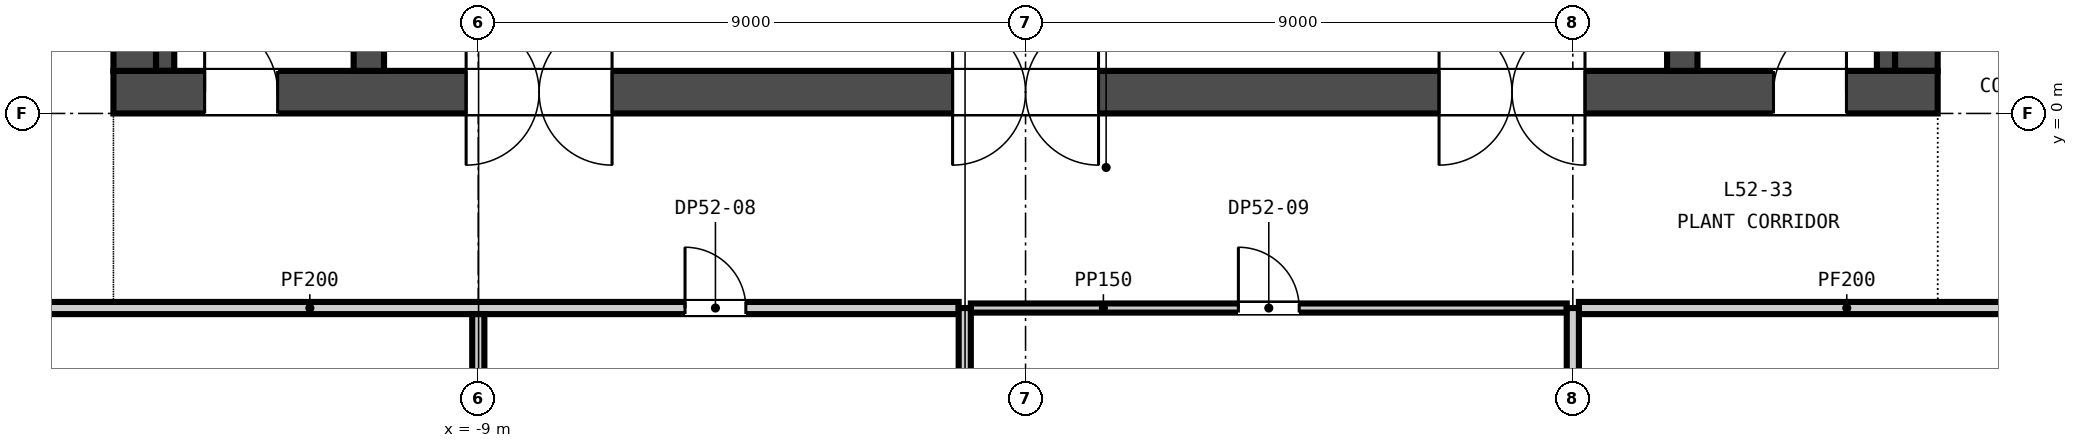
"""IFC4 building model, lengths in metres.
Left out: names, types, materials, properties, quantities, classifications, styles, units other than length and angle.
Written with IfcOpenShell. Run it as: python <this file> out.ifc"""

import sys

from ifc_helpers import new_model, si_unit, direction, frame, frame_2d, origin, place, context, subcontext, project, spatial, rectangle, extrude, element, fill, save


model = new_model("IFC4")
c1 = context("Model", 3, precision=1e-05, world=origin(), true_north=direction((0.0, 1.0)))
c2 = subcontext(c1, "Body", "Model", "MODEL_VIEW")
j1 = project(units=[si_unit("LENGTHUNIT", "METRE"), si_unit("PLANEANGLEUNIT", "RADIAN")], contexts=[c1])
p1 = place(None, origin())
s1 = spatial("IfcSite", under=j1, at=p1, CompositionType="ELEMENT")
p2 = place(p1, origin())
s2 = spatial("IfcBuilding", under=s1, at=p2, CompositionType="ELEMENT")
p3 = place(p2, frame((0.0, 0.0, 207.3)))
s3 = spatial("IfcBuildingStorey", under=s2, at=p3, CompositionType="ELEMENT", Elevation=207.3)
p4 = place(p3, frame((-15.0, 0.35, -0.3), z_axis=(0.0, 0.0, 1.0), x_axis=(1.0, 0.0, 0.0)))
e1 = element("IfcWall", 1, at=p4, inside=s3, PredefinedType="SOLIDWALL", context=c2, shape_type="SweptSolid", body=[
    extrude(rectangle(XDim=30.0, YDim=0.7, at=frame_2d((15.0, 0.0))), origin(), (0.0, 0.0, 1.0), 4.5),
])
p5 = place(p4, frame((5.8, 0.0, 0.3)))
e2 = element("IfcOpeningElement", 2, at=p5, cuts=e1, PredefinedType="OPENING", context=c2, shape_type="SweptSolid", body=[
    extrude(rectangle(XDim=2.4, YDim=2.4, at=frame_2d((1.2, 1.2))), frame((0.0, 0.36, 0.0), z_axis=(0.0, -1.0, 0.0), x_axis=(1.0, 0.0, 0.0)), (0.0, 0.0, 1.0), 0.72),
])
p6 = place(p4, frame((13.8, 0.0, 0.3)))
e3 = element("IfcOpeningElement", 3, at=p6, cuts=e1, PredefinedType="OPENING", context=c2, shape_type="SweptSolid", body=[
    extrude(rectangle(XDim=2.4, YDim=2.4, at=frame_2d((1.2, 1.2))), frame((0.0, 0.36, 0.0), z_axis=(0.0, -1.0, 0.0), x_axis=(1.0, 0.0, 0.0)), (0.0, 0.0, 1.0), 0.72),
])
p7 = place(p4, frame((21.8, 0.0, 0.3)))
e4 = element("IfcOpeningElement", 4, at=p7, cuts=e1, PredefinedType="OPENING", context=c2, shape_type="SweptSolid", body=[
    extrude(rectangle(XDim=2.4, YDim=2.4, at=frame_2d((1.2, 1.2))), frame((0.0, 0.36, 0.0), z_axis=(0.0, -1.0, 0.0), x_axis=(1.0, 0.0, 0.0)), (0.0, 0.0, 1.0), 0.72),
])
p8 = place(p4, frame((1.5, 0.0, 0.3)))
e5 = element("IfcOpeningElement", 5, at=p8, cuts=e1, PredefinedType="OPENING", context=c2, shape_type="SweptSolid", body=[
    extrude(rectangle(XDim=1.2, YDim=2.1, at=frame_2d((0.6, 1.05))), frame((0.0, 0.36, 0.0), z_axis=(0.0, -1.0, 0.0), x_axis=(1.0, 0.0, 0.0)), (0.0, 0.0, 1.0), 0.72),
])
p9 = place(p4, frame((27.3, 0.0, 0.3)))
e6 = element("IfcOpeningElement", 6, at=p9, cuts=e1, PredefinedType="OPENING", context=c2, shape_type="SweptSolid", body=[
    extrude(rectangle(XDim=1.2, YDim=2.1, at=frame_2d((0.6, 1.05))), frame((0.0, 0.36, 0.0), z_axis=(0.0, -1.0, 0.0), x_axis=(1.0, 0.0, 0.0)), (0.0, 0.0, 1.0), 0.72),
])
for number, where, z_axis, x_axis in (
    (7, (-14.65, 0.7, -0.3), (0.0, 0.0, 1.0), (0.0, 1.0, 0.0)),
    (8, (14.65, 0.7, -0.3), (0.0, 0.0, 1.0), (0.0, 1.0, 0.0)),
):
    element("IfcWall", number, at=place(p3, frame(where, z_axis=z_axis, x_axis=x_axis)), inside=s3, PredefinedType="SOLIDWALL", context=c2, shape_type="SweptSolid", body=[
        extrude(rectangle(XDim=13.6, YDim=0.7, at=frame_2d((6.8, 0.0))), origin(), (0.0, 0.0, 1.0), 4.5),
    ])
for number, where, z_axis, x_axis in (
    (9, (-10.8, 0.7, -0.3), (0.0, 0.0, 1.0), (0.0, 1.0, 0.0)),
    (10, (10.8, 0.7, -0.3), (0.0, 0.0, 1.0), (0.0, 1.0, 0.0)),
):
    element("IfcWall", number, at=place(p3, frame(where, z_axis=z_axis, x_axis=x_axis)), inside=s3, PredefinedType="SOLIDWALL", context=c2, shape_type="SweptSolid", body=[
        extrude(rectangle(XDim=13.6, YDim=0.5, at=frame_2d((6.8, 0.0))), origin(), (0.0, 0.0, 1.0), 4.5),
    ])
for number, where, z_axis, x_axis in (
    (11, (-14.15, 0.7, 0.0), (0.0, 0.0, 1.0), (0.0, 1.0, 0.0)),
    (12, (14.15, 0.7, 0.0), (0.0, 0.0, 1.0), (0.0, 1.0, 0.0)),
):
    element("IfcWall", number, at=place(p3, frame(where, z_axis=z_axis, x_axis=x_axis)), inside=s3, PredefinedType="SOLIDWALL", context=c2, shape_type="SweptSolid", body=[
        extrude(rectangle(XDim=13.6, YDim=0.3, at=frame_2d((6.8, 0.0))), origin(), (0.0, 0.0, 1.0), 4.2),
    ])
p10 = place(p3, frame((-17.9, -3.2, 0.0), z_axis=(0.0, 0.0, 1.0), x_axis=(1.0, 0.0, 0.0)))
e13 = element("IfcWall", 13, at=p10, inside=s3, PredefinedType="PARTITIONING", context=c2, shape_type="SweptSolid", body=[
    extrude(rectangle(XDim=16.8, YDim=0.2, at=frame_2d((8.4, 0.0))), origin(), (0.0, 0.0, 1.0), 4.2),
])
p11 = place(p10, frame((12.3, 0.0, 0.0)))
e14 = element("IfcOpeningElement", 14, at=p11, cuts=e13, PredefinedType="OPENING", context=c2, shape_type="SweptSolid", body=[
    extrude(rectangle(XDim=1.0, YDim=2.1, at=frame_2d((0.5, 1.05))), frame((0.0, 0.11, 0.0), z_axis=(0.0, -1.0, 0.0), x_axis=(1.0, 0.0, 0.0)), (0.0, 0.0, 1.0), 0.22),
])
p12 = place(p3, frame((-0.9, -3.2, 0.0), z_axis=(0.0, 0.0, 1.0), x_axis=(1.0, 0.0, 0.0)))
e15 = element("IfcWall", 15, at=p12, inside=s3, PredefinedType="PARTITIONING", context=c2, shape_type="SweptSolid", body=[
    extrude(rectangle(XDim=9.8, YDim=0.15, at=frame_2d((4.9, 0.0))), origin(), (0.0, 0.0, 1.0), 4.2),
])
p13 = place(p12, frame((4.4, 0.0, 0.0)))
e16 = element("IfcOpeningElement", 16, at=p13, cuts=e15, PredefinedType="OPENING", context=c2, shape_type="SweptSolid", body=[
    extrude(rectangle(XDim=1.0, YDim=2.1, at=frame_2d((0.5, 1.05))), frame((0.0, 0.085, 0.0), z_axis=(0.0, -1.0, 0.0), x_axis=(1.0, 0.0, 0.0)), (0.0, 0.0, 1.0), 0.17),
])
p14 = place(p3, frame((9.1, -3.2, 0.0), z_axis=(0.0, 0.0, 1.0), x_axis=(1.0, 0.0, 0.0)))
e17 = element("IfcWall", 17, at=p14, inside=s3, PredefinedType="PARTITIONING", context=c2, shape_type="SweptSolid", body=[
    extrude(rectangle(XDim=8.8, YDim=0.2, at=frame_2d((4.4, 0.0))), origin(), (0.0, 0.0, 1.0), 4.2),
])
p15 = place(p3, frame((-9.0, -9.0, 0.0), z_axis=(0.0, 0.0, 1.0), x_axis=(0.0, 1.0, 0.0)))
e18 = element("IfcWall", 18, at=p15, inside=s3, PredefinedType="PARTITIONING", context=c2, shape_type="SweptSolid", body=[
    extrude(rectangle(XDim=5.7, YDim=0.2, at=frame_2d((2.85, 0.0))), origin(), (0.0, 0.0, 1.0), 4.2),
])
for number, where, z_axis, x_axis in (
    (19, (-1.0, -9.0, 0.0), (0.0, 0.0, 1.0), (0.0, 1.0, 0.0)),
    (20, (9.0, -9.0, 0.0), (0.0, 0.0, 1.0), (0.0, 1.0, 0.0)),
):
    element("IfcWall", number, at=place(p3, frame(where, z_axis=z_axis, x_axis=x_axis)), inside=s3, PredefinedType="PARTITIONING", context=c2, shape_type="SweptSolid", body=[
        extrude(rectangle(XDim=5.8, YDim=0.2, at=frame_2d((2.9, 0.0))), origin(), (0.0, 0.0, 1.0), 4.2),
    ])
p16 = place(p5, origin())
e21 = element("IfcDoor", 21, at=p16, inside=s3, OperationType="DOUBLE_DOOR_DOUBLE_SWING", PredefinedType="DOOR", context=c2, shape_type="SweptSolid", body=[
    extrude(rectangle(XDim=2.4, YDim=2.4, at=frame_2d((1.2, 1.2))), frame((0.0, 0.025, 0.0), z_axis=(0.0, -1.0, 0.0), x_axis=(1.0, 0.0, 0.0)), (0.0, 0.0, 1.0), 0.05),
])
fill(e2, e21)
p17 = place(p6, origin())
e22 = element("IfcDoor", 22, at=p17, inside=s3, OperationType="DOUBLE_DOOR_DOUBLE_SWING", PredefinedType="DOOR", context=c2, shape_type="SweptSolid", body=[
    extrude(rectangle(XDim=2.4, YDim=2.4, at=frame_2d((1.2, 1.2))), frame((0.0, 0.025, 0.0), z_axis=(0.0, -1.0, 0.0), x_axis=(1.0, 0.0, 0.0)), (0.0, 0.0, 1.0), 0.05),
])
fill(e3, e22)
p18 = place(p7, origin())
e23 = element("IfcDoor", 23, at=p18, inside=s3, OperationType="DOUBLE_DOOR_DOUBLE_SWING", PredefinedType="DOOR", context=c2, shape_type="SweptSolid", body=[
    extrude(rectangle(XDim=2.4, YDim=2.4, at=frame_2d((1.2, 1.2))), frame((0.0, 0.025, 0.0), z_axis=(0.0, -1.0, 0.0), x_axis=(1.0, 0.0, 0.0)), (0.0, 0.0, 1.0), 0.05),
])
fill(e4, e23)
p19 = place(p8, origin())
e24 = element("IfcDoor", 24, at=p19, inside=s3, OperationType="SINGLE_SWING_LEFT", PredefinedType="DOOR", context=c2, shape_type="SweptSolid", body=[
    extrude(rectangle(XDim=1.2, YDim=2.1, at=frame_2d((0.6, 1.05))), frame((0.0, 0.025, 0.0), z_axis=(0.0, -1.0, 0.0), x_axis=(1.0, 0.0, 0.0)), (0.0, 0.0, 1.0), 0.05),
])
fill(e5, e24)
p20 = place(p9, origin())
e25 = element("IfcDoor", 25, at=p20, inside=s3, OperationType="SINGLE_SWING_RIGHT", PredefinedType="DOOR", context=c2, shape_type="SweptSolid", body=[
    extrude(rectangle(XDim=1.2, YDim=2.1, at=frame_2d((0.6, 1.05))), frame((0.0, 0.025, 0.0), z_axis=(0.0, -1.0, 0.0), x_axis=(1.0, 0.0, 0.0)), (0.0, 0.0, 1.0), 0.05),
])
fill(e6, e25)
p21 = place(p11, origin())
e26 = element("IfcDoor", 26, at=p21, inside=s3, OperationType="SINGLE_SWING_LEFT", PredefinedType="DOOR", context=c2, shape_type="SweptSolid", body=[
    extrude(rectangle(XDim=1.0, YDim=2.1, at=frame_2d((0.5, 1.05))), frame((0.0, 0.025, 0.0), z_axis=(0.0, -1.0, 0.0), x_axis=(1.0, 0.0, 0.0)), (0.0, 0.0, 1.0), 0.05),
])
fill(e14, e26)
p22 = place(p13, origin())
e27 = element("IfcDoor", 27, at=p22, inside=s3, OperationType="SINGLE_SWING_LEFT", PredefinedType="DOOR", context=c2, shape_type="SweptSolid", body=[
    extrude(rectangle(XDim=1.0, YDim=2.1, at=frame_2d((0.5, 1.05))), frame((0.0, 0.025, 0.0), z_axis=(0.0, -1.0, 0.0), x_axis=(1.0, 0.0, 0.0)), (0.0, 0.0, 1.0), 0.05),
])
fill(e16, e27)
save(model, sys.argv[1])
